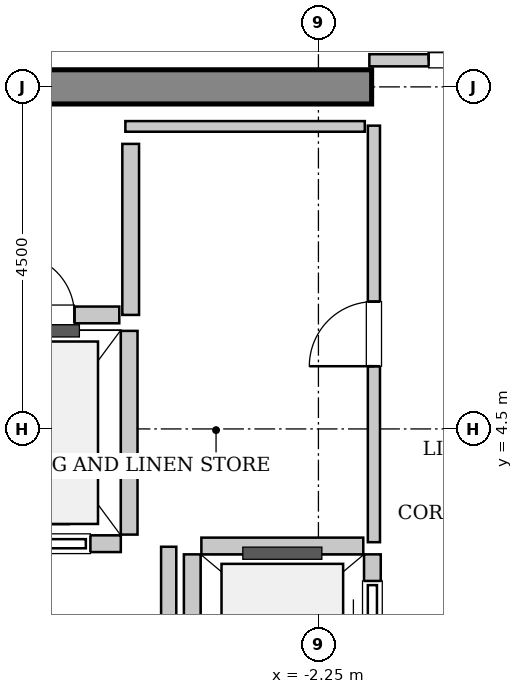
"""IFC4 building model, lengths in metres.
Left out: names, types, materials, properties, quantities, classifications, styles, units other than length and angle.
Written with IfcOpenShell. Run it as: python <this file> out.ifc"""

import sys

from ifc_helpers import new_model, si_unit, direction, frame, frame_2d, origin, place, context, subcontext, project, spatial, rectangle, extrude, source, transform, mapped, element, fill, save


model = new_model("IFC4")
c1 = context("Model", 3, precision=1e-05, world=origin(), true_north=direction((0.0, 1.0)))
c2 = subcontext(c1, "Body", "Model", "MODEL_VIEW")
j1 = project(units=[si_unit("LENGTHUNIT", "METRE"), si_unit("PLANEANGLEUNIT", "RADIAN")], contexts=[c1])
p1 = place(None, origin())
s1 = spatial("IfcSite", under=j1, at=p1, CompositionType="ELEMENT")
p2 = place(p1, origin())
s2 = spatial("IfcBuilding", under=s1, at=p2, CompositionType="ELEMENT")
p3 = place(p2, frame((0.0, 0.0, 306.4)))
s3 = spatial("IfcBuildingStorey", under=s2, at=p3, CompositionType="ELEMENT", Elevation=306.4)
m1 = source(origin(), c2, "Body", "SweptSolid", [
    extrude(rectangle(XDim=9.925, YDim=0.45, at=frame_2d((4.962, 0.0))), origin(), (0.0, 0.0, 1.0), 3.8),
])
p4 = place(p3, frame((-11.475, 9.0, 0.0), z_axis=(0.0, 0.0, 1.0), x_axis=(1.0, 0.0, 0.0)))
e1 = element("IfcWall", 1, at=p4, inside=s3, PredefinedType="SHEAR", context=c2, shape_type="MappedRepresentation", body=[
    mapped(m1, transform((0.0, 0.0, 0.0), x_axis=(1.0, 0.0, 0.0), y_axis=(0.0, 1.0, 0.0), z_axis=(0.0, 0.0, 1.0), scale=1.0)),
])
m2 = source(origin(), c2, "Body", "SweptSolid", [
    extrude(rectangle(XDim=2.0, YDim=0.22, at=frame_2d((1.0, 0.0))), origin(), (0.0, 0.0, 1.0), 3.535),
])
p5 = place(p3, frame((-6.85, 2.99, 0.0), z_axis=(0.0, 0.0, 1.0), x_axis=(1.0, 0.0, 0.0)))
e2 = element("IfcWall", 2, at=p5, inside=s3, PredefinedType="SOLIDWALL", context=c2, shape_type="MappedRepresentation", body=[
    mapped(m2, transform((0.0, 0.0, 0.0), x_axis=(1.0, 0.0, 0.0), y_axis=(0.0, 1.0, 0.0), z_axis=(0.0, 0.0, 1.0), scale=1.0)),
])
p6 = place(p5, frame((0.4, 0.0, 0.0)))
e3 = element("IfcOpeningElement", 3, at=p6, cuts=e2, PredefinedType="OPENING", context=c2, shape_type="SweptSolid", body=[
    extrude(rectangle(XDim=1.2, YDim=2.2, at=frame_2d((0.6, 1.1))), frame((0.0, 0.12, 0.0), z_axis=(0.0, -1.0, 0.0), x_axis=(1.0, 0.0, 0.0)), (0.0, 0.0, 1.0), 0.24),
])
m3 = source(origin(), c2, "Body", "SweptSolid", [
    extrude(rectangle(XDim=2.68, YDim=0.22, at=frame_2d((1.34, 0.0))), origin(), (0.0, 0.0, 1.0), 3.535),
])
p7 = place(p3, frame((-4.74, 3.11, 0.0), z_axis=(0.0, 0.0, 1.0), x_axis=(0.0, 1.0, 0.0)))
e4 = element("IfcWall", 4, at=p7, inside=s3, PredefinedType="SOLIDWALL", context=c2, shape_type="MappedRepresentation", body=[
    mapped(m3, transform((0.0, 0.0, 0.0), x_axis=(1.0, 0.0, 0.0), y_axis=(0.0, 1.0, 0.0), z_axis=(0.0, 0.0, 1.0), scale=1.0)),
])
m4 = source(origin(), c2, "Body", "SweptSolid", [
    extrude(rectangle(XDim=5.7, YDim=0.22, at=frame_2d((2.85, 0.0))), origin(), (0.0, 0.0, 1.0), 3.535),
])
p8 = place(p3, frame((-1.54, -2.85, 0.0), z_axis=(0.0, 0.0, 1.0), x_axis=(0.0, 1.0, 0.0)))
e5 = element("IfcWall", 5, at=p8, inside=s3, PredefinedType="SOLIDWALL", context=c2, shape_type="MappedRepresentation", body=[
    mapped(m4, transform((0.0, 0.0, 0.0), x_axis=(1.0, 0.0, 0.0), y_axis=(0.0, 1.0, 0.0), z_axis=(0.0, 0.0, 1.0), scale=1.0)),
])
p9 = place(p8, frame((0.35, 0.0, 0.0)))
e6 = element("IfcOpeningElement", 6, at=p9, cuts=e5, PredefinedType="OPENING", context=c2, shape_type="SweptSolid", body=[
    extrude(rectangle(XDim=1.1, YDim=2.2, at=frame_2d((0.55, 1.1))), frame((0.0, 0.12, 0.0), z_axis=(0.0, -1.0, 0.0), x_axis=(1.0, 0.0, 0.0)), (0.0, 0.0, 1.0), 0.24),
])
p10 = place(p8, frame((2.3, 0.0, 0.0)))
e7 = element("IfcOpeningElement", 7, at=p10, cuts=e5, PredefinedType="OPENING", context=c2, shape_type="SweptSolid", body=[
    extrude(rectangle(XDim=1.1, YDim=2.2, at=frame_2d((0.55, 1.1))), frame((0.0, 0.12, 0.0), z_axis=(0.0, -1.0, 0.0), x_axis=(1.0, 0.0, 0.0)), (0.0, 0.0, 1.0), 0.24),
])
p11 = place(p8, frame((4.25, 0.0, 0.0)))
e8 = element("IfcOpeningElement", 8, at=p11, cuts=e5, PredefinedType="OPENING", context=c2, shape_type="SweptSolid", body=[
    extrude(rectangle(XDim=1.1, YDim=2.2, at=frame_2d((0.55, 1.1))), frame((0.0, 0.12, 0.0), z_axis=(0.0, -1.0, 0.0), x_axis=(1.0, 0.0, 0.0)), (0.0, 0.0, 1.0), 0.24),
])
p12 = place(p3, frame((-3.91, 2.85, 0.0), z_axis=(0.0, 0.0, 1.0), x_axis=(0.0, -1.0, 0.0)))
e9 = element("IfcWall", 9, at=p12, inside=s3, PredefinedType="SOLIDWALL", context=c2, shape_type="MappedRepresentation", body=[
    mapped(m4, transform((0.0, 0.0, 0.0), x_axis=(1.0, 0.0, 0.0), y_axis=(0.0, 1.0, 0.0), z_axis=(0.0, 0.0, 1.0), scale=1.0)),
])
m5 = source(origin(), c2, "Body", "SweptSolid", [
    extrude(rectangle(XDim=2.13, YDim=0.22, at=frame_2d((1.065, 0.0))), origin(), (0.0, 0.0, 1.0), 3.535),
])
p13 = place(p3, frame((-1.66, 2.96, 0.0), z_axis=(0.0, 0.0, 1.0), x_axis=(-1.0, 0.0, 0.0)))
e10 = element("IfcWall", 10, at=p13, inside=s3, PredefinedType="SOLIDWALL", context=c2, shape_type="MappedRepresentation", body=[
    mapped(m5, transform((0.0, 0.0, 0.0), x_axis=(1.0, 0.0, 0.0), y_axis=(0.0, 1.0, 0.0), z_axis=(0.0, 0.0, 1.0), scale=1.0)),
])
m6 = source(origin(), c2, "Body", "SweptSolid", [
    extrude(rectangle(XDim=2.25, YDim=0.22, at=frame_2d((1.125, 0.0))), origin(), (0.0, 0.0, 1.0), 3.535),
])
p14 = place(p3, frame((-4.72, 6.0, 0.0), z_axis=(0.0, 0.0, 1.0), x_axis=(0.0, 1.0, 0.0)))
e11 = element("IfcWall", 11, at=p14, inside=s3, PredefinedType="SOLIDWALL", context=c2, shape_type="MappedRepresentation", body=[
    mapped(m6, transform((0.0, 0.0, 0.0), x_axis=(1.0, 0.0, 0.0), y_axis=(0.0, 1.0, 0.0), z_axis=(0.0, 0.0, 1.0), scale=1.0)),
])
m7 = source(origin(), c2, "Body", "SweptSolid", [
    extrude(rectangle(XDim=1.98, YDim=0.22, at=frame_2d((0.99, 0.0))), origin(), (0.0, 0.0, 1.0), 3.535),
])
p15 = place(p3, frame((-6.85, 6.0, 0.0), z_axis=(0.0, 0.0, 1.0), x_axis=(1.0, 0.0, 0.0)))
e12 = element("IfcWall", 12, at=p15, inside=s3, PredefinedType="SOLIDWALL", context=c2, shape_type="MappedRepresentation", body=[
    mapped(m7, transform((0.0, 0.0, 0.0), x_axis=(1.0, 0.0, 0.0), y_axis=(0.0, 1.0, 0.0), z_axis=(0.0, 0.0, 1.0), scale=1.0)),
])
p16 = place(p15, frame((0.59, 0.0, 0.0)))
e13 = element("IfcOpeningElement", 13, at=p16, cuts=e12, PredefinedType="OPENING", context=c2, shape_type="SweptSolid", body=[
    extrude(rectangle(XDim=0.8, YDim=2.0, at=frame_2d((0.4, 1.0))), frame((0.0, 0.12, 0.0), z_axis=(0.0, -1.0, 0.0), x_axis=(1.0, 0.0, 0.0)), (0.0, 0.0, 1.0), 0.24),
])
m8 = source(origin(), c2, "Body", "SweptSolid", [
    extrude(rectangle(XDim=5.9, YDim=0.2, at=frame_2d((2.95, 0.0))), origin(), (0.0, 0.0, 1.0), 3.535),
])
p17 = place(p3, frame((-4.22, -2.95, 0.0), z_axis=(0.0, 0.0, 1.0), x_axis=(0.0, 1.0, 0.0)))
e14 = element("IfcWall", 14, at=p17, inside=s3, PredefinedType="PARTITIONING", context=c2, shape_type="MappedRepresentation", body=[
    mapped(m8, transform((0.0, 0.0, 0.0), x_axis=(1.0, 0.0, 0.0), y_axis=(0.0, 1.0, 0.0), z_axis=(0.0, 0.0, 1.0), scale=1.0)),
])
m9 = source(origin(), c2, "Body", "SweptSolid", [
    extrude(rectangle(XDim=3.16, YDim=0.16, at=frame_2d((1.58, 0.0))), origin(), (0.0, 0.0, 1.0), 2.625),
])
p18 = place(p3, frame((-1.58, 9.35, 0.0), z_axis=(0.0, 0.0, 1.0), x_axis=(1.0, 0.0, 0.0)))
e15 = element("IfcWall", 15, at=p18, inside=s3, PredefinedType="PARTITIONING", context=c2, shape_type="MappedRepresentation", body=[
    mapped(m9, transform((0.0, 0.0, 0.0), x_axis=(1.0, 0.0, 0.0), y_axis=(0.0, 1.0, 0.0), z_axis=(0.0, 0.0, 1.0), scale=1.0)),
])
p19 = place(p18, frame((0.78, 0.0, 0.0)))
e16 = element("IfcOpeningElement", 16, at=p19, cuts=e15, PredefinedType="OPENING", context=c2, shape_type="SweptSolid", body=[
    extrude(rectangle(XDim=1.6, YDim=2.3, at=frame_2d((0.8, 1.15))), frame((0.0, 0.09, 0.0), z_axis=(0.0, -1.0, 0.0), x_axis=(1.0, 0.0, 0.0)), (0.0, 0.0, 1.0), 0.18),
])
m10 = source(origin(), c2, "Body", "SweptSolid", [
    extrude(rectangle(XDim=5.48, YDim=0.16, at=frame_2d((2.74, 0.0))), origin(), (0.0, 0.0, 1.0), 3.535),
])
p20 = place(p3, frame((-1.52, 3.01, 0.0), z_axis=(0.0, 0.0, 1.0), x_axis=(0.0, 1.0, 0.0)))
e17 = element("IfcWall", 17, at=p20, inside=s3, PredefinedType="PARTITIONING", context=c2, shape_type="MappedRepresentation", body=[
    mapped(m10, transform((0.0, 0.0, 0.0), x_axis=(1.0, 0.0, 0.0), y_axis=(0.0, 1.0, 0.0), z_axis=(0.0, 0.0, 1.0), scale=1.0)),
])
p21 = place(p20, frame((2.315, 0.0, 0.0)))
e18 = element("IfcOpeningElement", 18, at=p21, cuts=e17, PredefinedType="OPENING", context=c2, shape_type="SweptSolid", body=[
    extrude(rectangle(XDim=0.85, YDim=2.1, at=frame_2d((0.425, 1.05))), frame((0.0, 0.09, 0.0), z_axis=(0.0, -1.0, 0.0), x_axis=(1.0, 0.0, 0.0)), (0.0, 0.0, 1.0), 0.18),
])
m11 = source(origin(), c2, "Body", "SweptSolid", [
    extrude(rectangle(XDim=3.15, YDim=0.14, at=frame_2d((1.575, 0.0))), origin(), (0.0, 0.0, 1.0), 3.535),
])
p22 = place(p3, frame((-4.79, 8.48, 0.0), z_axis=(0.0, 0.0, 1.0), x_axis=(1.0, 0.0, 0.0)))
e19 = element("IfcWall", 19, at=p22, inside=s3, PredefinedType="PARTITIONING", context=c2, shape_type="MappedRepresentation", body=[
    mapped(m11, transform((0.0, 0.0, 0.0), x_axis=(1.0, 0.0, 0.0), y_axis=(0.0, 1.0, 0.0), z_axis=(0.0, 0.0, 1.0), scale=1.0)),
])
m12 = source(origin(), c2, "Body", "SweptSolid", [
    extrude(rectangle(XDim=1.2, YDim=2.2, at=frame_2d((0.6, 1.1))), frame((0.0, 0.025, 0.0), z_axis=(0.0, -1.0, 0.0), x_axis=(1.0, 0.0, 0.0)), (0.0, 0.0, 1.0), 0.05),
])
p23 = place(p6, origin())
e20 = element("IfcDoor", 20, at=p23, inside=s3, OperationType="SLIDING_TO_LEFT", PredefinedType="DOOR", context=c2, shape_type="MappedRepresentation", body=[
    mapped(m12, transform((0.0, 0.0, 0.0), x_axis=(1.0, 0.0, 0.0), y_axis=(0.0, 1.0, 0.0), z_axis=(0.0, 0.0, 1.0), scale=1.0)),
])
fill(e3, e20)
m13 = source(origin(), c2, "Body", "SweptSolid", [
    extrude(rectangle(XDim=1.1, YDim=2.2, at=frame_2d((0.55, 1.1))), frame((0.0, 0.025, 0.0), z_axis=(0.0, -1.0, 0.0), x_axis=(1.0, 0.0, 0.0)), (0.0, 0.0, 1.0), 0.05),
])
p24 = place(p11, origin())
e21 = element("IfcDoor", 21, at=p24, inside=s3, OperationType="DOUBLE_DOOR_SLIDING", PredefinedType="DOOR", context=c2, shape_type="MappedRepresentation", body=[
    mapped(m13, transform((0.0, 0.0, 0.0), x_axis=(1.0, 0.0, 0.0), y_axis=(0.0, 1.0, 0.0), z_axis=(0.0, 0.0, 1.0), scale=1.0)),
])
fill(e8, e21)
m14 = source(origin(), c2, "Body", "SweptSolid", [
    extrude(rectangle(XDim=0.8, YDim=2.0, at=frame_2d((0.4, 1.0))), frame((0.0, 0.025, 0.0), z_axis=(0.0, -1.0, 0.0), x_axis=(1.0, 0.0, 0.0)), (0.0, 0.0, 1.0), 0.05),
])
p25 = place(p16, origin())
e22 = element("IfcDoor", 22, at=p25, inside=s3, OperationType="SINGLE_SWING_LEFT", PredefinedType="TRAPDOOR", context=c2, shape_type="MappedRepresentation", body=[
    mapped(m14, transform((0.0, 0.0, 0.0), x_axis=(1.0, 0.0, 0.0), y_axis=(0.0, 1.0, 0.0), z_axis=(0.0, 0.0, 1.0), scale=1.0)),
])
fill(e13, e22)
m15 = source(origin(), c2, "Body", "SweptSolid", [
    extrude(rectangle(XDim=1.6, YDim=2.3, at=frame_2d((0.8, 1.15))), frame((0.0, 0.025, 0.0), z_axis=(0.0, -1.0, 0.0), x_axis=(1.0, 0.0, 0.0)), (0.0, 0.0, 1.0), 0.05),
])
p26 = place(p19, origin())
e23 = element("IfcDoor", 23, at=p26, inside=s3, OperationType="DOUBLE_DOOR_SINGLE_SWING", PredefinedType="DOOR", context=c2, shape_type="MappedRepresentation", body=[
    mapped(m15, transform((0.0, 0.0, 0.0), x_axis=(1.0, 0.0, 0.0), y_axis=(0.0, 1.0, 0.0), z_axis=(0.0, 0.0, 1.0), scale=1.0)),
])
fill(e16, e23)
m16 = source(origin(), c2, "Body", "SweptSolid", [
    extrude(rectangle(XDim=0.85, YDim=2.1, at=frame_2d((0.425, 1.05))), frame((0.0, 0.025, 0.0), z_axis=(0.0, -1.0, 0.0), x_axis=(1.0, 0.0, 0.0)), (0.0, 0.0, 1.0), 0.05),
])
p27 = place(p21, origin())
e24 = element("IfcDoor", 24, at=p27, inside=s3, OperationType="SINGLE_SWING_LEFT", PredefinedType="DOOR", context=c2, shape_type="MappedRepresentation", body=[
    mapped(m16, transform((0.0, 0.0, 0.0), x_axis=(1.0, 0.0, 0.0), y_axis=(0.0, 1.0, 0.0), z_axis=(0.0, 0.0, 1.0), scale=1.0)),
])
fill(e18, e24)
save(model, sys.argv[1])
